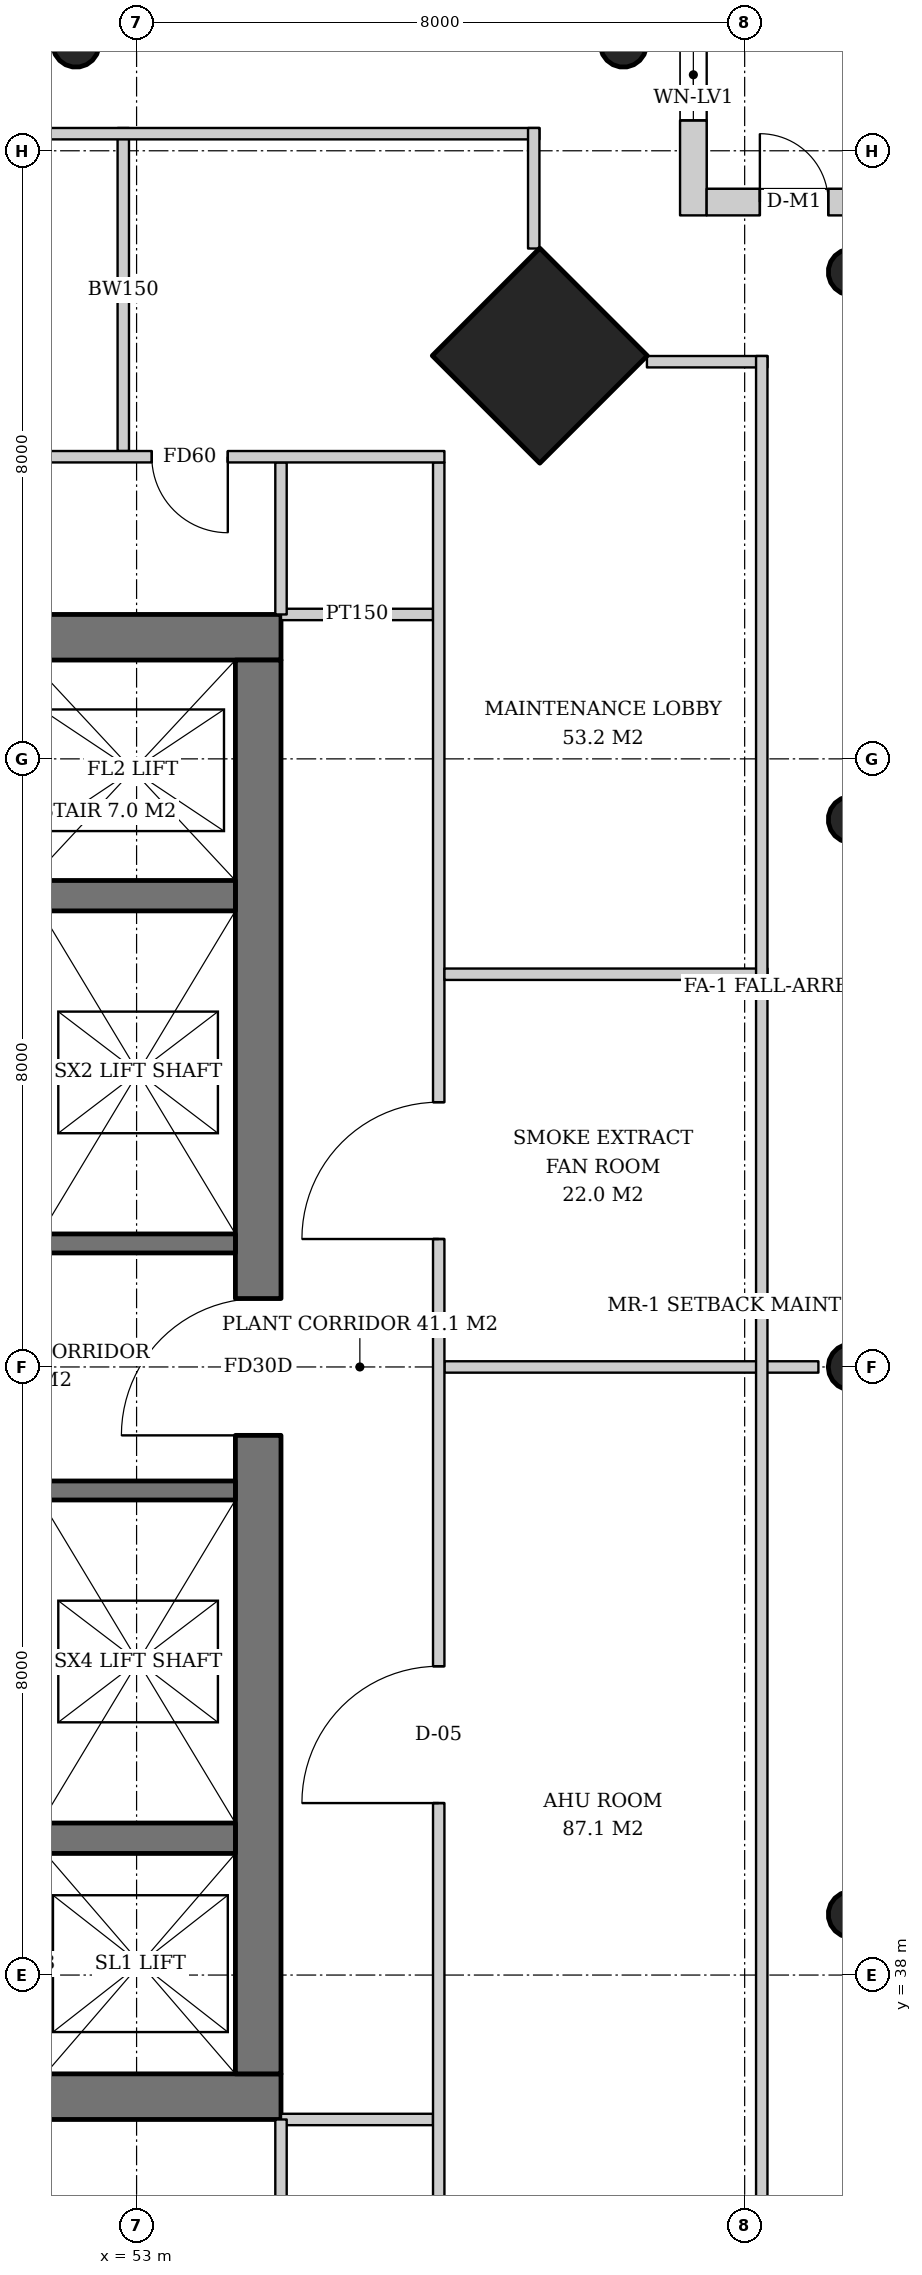
"""IFC4 building model, lengths in metres.
Left out: names, types, materials, properties, quantities, classifications, styles, units other than length and angle.
Written with IfcOpenShell. Run it as: python <this file> out.ifc"""

import sys

from ifc_helpers import new_model, si_unit, direction, frame, frame_2d, origin, origin_2d, place, context, subcontext, project, spatial, rectangle, hollow_circle, extrude, element, fill, save


model = new_model("IFC4")
c1 = context("Model", 3, precision=1e-05, world=origin(), true_north=direction((0.0, 1.0)))
c2 = subcontext(c1, "Body", "Model", "MODEL_VIEW")
j1 = project(units=[si_unit("LENGTHUNIT", "METRE"), si_unit("PLANEANGLEUNIT", "RADIAN")], contexts=[c1])
p1 = place(None, origin())
s1 = spatial("IfcSite", under=j1, at=p1, CompositionType="ELEMENT")
p2 = place(p1, origin())
s2 = spatial("IfcBuilding", under=s1, at=p2, CompositionType="ELEMENT")
p3 = place(p2, frame((0.0, 0.0, 226.2)))
s3 = spatial("IfcBuildingStorey", under=s2, at=p3, CompositionType="ELEMENT", Elevation=226.2)
p4 = place(p3, frame((58.343, 59.343, 0.0), z_axis=(-0.031898107953, -0.031898107953, 0.998981992539), x_axis=(0.707106781187, -0.707106781187, 0.0)))
e1 = element("IfcColumn", 1, at=p4, inside=s3, PredefinedType="COLUMN", context=c2, shape_type="SweptSolid", body=[
    extrude(rectangle(XDim=2.0, YDim=2.0, at=origin_2d()), origin(), (0.0, 0.0, 1.0), 3.804),
])
p5 = place(p3, frame((62.443, 60.443, 0.0), z_axis=(-0.031898107953, -0.031898107953, 0.998981992539), x_axis=(0.707106781187, -0.707106781187, 0.0)))
e2 = element("IfcColumn", 2, at=p5, inside=s3, PredefinedType="COLUMN", context=c2, shape_type="SweptSolid", body=[
    extrude(hollow_circle(Radius=0.305, WallThickness=0.025, at=origin_2d()), origin(), (0.0, 0.0, 1.0), 3.804),
])
p6 = place(p3, frame((62.443, 38.779, 0.0), z_axis=(-0.031910269556, 0.015987237665, 0.999362868496), x_axis=(-0.447933021895, -0.894067115991, 0.0)))
e3 = element("IfcColumn", 3, at=p6, inside=s3, PredefinedType="COLUMN", context=c2, shape_type="SweptSolid", body=[
    extrude(hollow_circle(Radius=0.305, WallThickness=0.025, at=origin_2d()), origin(), (0.0, 0.0, 1.0), 3.802),
])
p7 = place(p3, frame((62.443, 46.0, 0.0), z_axis=(-0.031914348339, 0.0, 0.999490607445), x_axis=(0.0, -1.0, 0.0)))
e4 = element("IfcColumn", 4, at=p7, inside=s3, PredefinedType="COLUMN", context=c2, shape_type="SweptSolid", body=[
    extrude(hollow_circle(Radius=0.305, WallThickness=0.025, at=origin_2d()), origin(), (0.0, 0.0, 1.0), 3.802),
])
p8 = place(p3, frame((62.443, 53.221, 0.0), z_axis=(-0.031910269556, -0.015987237665, 0.999362868496), x_axis=(0.447933021895, -0.894067115991, 0.0)))
e5 = element("IfcColumn", 5, at=p8, inside=s3, PredefinedType="COLUMN", context=c2, shape_type="SweptSolid", body=[
    extrude(hollow_circle(Radius=0.305, WallThickness=0.025, at=origin_2d()), origin(), (0.0, 0.0, 1.0), 3.802),
])
p9 = place(p3, frame((59.443, 63.443, 0.0), z_axis=(-0.031898107953, -0.031898107953, 0.998981992539), x_axis=(0.707106781187, -0.707106781187, 0.0)))
e6 = element("IfcColumn", 6, at=p9, inside=s3, PredefinedType="COLUMN", context=c2, shape_type="SweptSolid", body=[
    extrude(hollow_circle(Radius=0.305, WallThickness=0.025, at=origin_2d()), origin(), (0.0, 0.0, 1.0), 3.804),
])
p10 = place(p3, frame((52.221, 63.443, 0.0), z_axis=(-0.015987237665, -0.031910269556, 0.999362868496), x_axis=(0.894067115991, -0.447933021895, 0.0)))
e7 = element("IfcColumn", 7, at=p10, inside=s3, PredefinedType="COLUMN", context=c2, shape_type="SweptSolid", body=[
    extrude(hollow_circle(Radius=0.305, WallThickness=0.025, at=origin_2d()), origin(), (0.0, 0.0, 1.0), 3.802),
])
p11 = place(p3, frame((35.1, 36.4, 0.0), z_axis=(0.0, 0.0, 1.0), x_axis=(1.0, 0.0, 0.0)))
e8 = element("IfcWall", 8, at=p11, inside=s3, PredefinedType="SHEAR", context=c2, shape_type="SweptSolid", body=[
    extrude(rectangle(XDim=19.8, YDim=0.6, at=frame_2d((9.9, 0.0))), origin(), (0.0, 0.0, 1.0), 3.8),
])
p12 = place(p11, frame((3.9, 0.0, 0.0)))
e9 = element("IfcOpeningElement", 9, at=p12, cuts=e8, PredefinedType="OPENING", context=c2, shape_type="SweptSolid", body=[
    extrude(rectangle(XDim=1.0, YDim=2.1, at=frame_2d((0.5, 1.05))), frame((0.0, 0.31, 0.0), z_axis=(0.0, -1.0, 0.0), x_axis=(1.0, 0.0, 0.0)), (0.0, 0.0, 1.0), 0.62),
])
p13 = place(p11, frame((15.35, 0.0, 0.0)))
e10 = element("IfcOpeningElement", 10, at=p13, cuts=e8, PredefinedType="OPENING", context=c2, shape_type="SweptSolid", body=[
    extrude(rectangle(XDim=1.0, YDim=2.1, at=frame_2d((0.5, 1.05))), frame((0.0, 0.31, 0.0), z_axis=(0.0, -1.0, 0.0), x_axis=(1.0, 0.0, 0.0)), (0.0, 0.0, 1.0), 0.62),
])
p14 = place(p3, frame((35.1, 55.6, 0.0), z_axis=(0.0, 0.0, 1.0), x_axis=(1.0, 0.0, 0.0)))
e11 = element("IfcWall", 11, at=p14, inside=s3, PredefinedType="SHEAR", context=c2, shape_type="SweptSolid", body=[
    extrude(rectangle(XDim=19.8, YDim=0.6, at=frame_2d((9.9, 0.0))), origin(), (0.0, 0.0, 1.0), 3.8),
])
p15 = place(p14, frame((14.54, 0.0, 0.0)))
e12 = element("IfcOpeningElement", 12, at=p15, cuts=e11, PredefinedType="OPENING", context=c2, shape_type="SweptSolid", body=[
    extrude(rectangle(XDim=1.0, YDim=2.1, at=frame_2d((0.5, 1.05))), frame((0.0, 0.31, 0.0), z_axis=(0.0, -1.0, 0.0), x_axis=(1.0, 0.0, 0.0)), (0.0, 0.0, 1.0), 0.62),
])
p16 = place(p14, frame((2.425, 0.0, 0.0)))
e13 = element("IfcOpeningElement", 13, at=p16, cuts=e11, PredefinedType="OPENING", context=c2, shape_type="SweptSolid", body=[
    extrude(rectangle(XDim=1.0, YDim=2.1, at=frame_2d((0.5, 1.05))), frame((0.0, 0.31, 0.0), z_axis=(0.0, -1.0, 0.0), x_axis=(1.0, 0.0, 0.0)), (0.0, 0.0, 1.0), 0.62),
])
p17 = place(p3, frame((54.6, 36.7, 0.0), z_axis=(0.0, 0.0, 1.0), x_axis=(0.0, 1.0, 0.0)))
e14 = element("IfcWall", 14, at=p17, inside=s3, PredefinedType="SHEAR", context=c2, shape_type="SweptSolid", body=[
    extrude(rectangle(XDim=18.6, YDim=0.6, at=frame_2d((9.3, 0.0))), origin(), (0.0, 0.0, 1.0), 3.8),
])
p18 = place(p17, frame((8.4, 0.0, 0.0)))
e15 = element("IfcOpeningElement", 15, at=p18, cuts=e14, PredefinedType="OPENING", context=c2, shape_type="SweptSolid", body=[
    extrude(rectangle(XDim=1.8, YDim=2.4, at=frame_2d((0.9, 1.2))), frame((0.0, 0.31, 0.0), z_axis=(0.0, -1.0, 0.0), x_axis=(1.0, 0.0, 0.0)), (0.0, 0.0, 1.0), 0.62),
])
p19 = place(p3, frame((35.7, 39.8, 0.0), z_axis=(0.0, 0.0, 1.0), x_axis=(1.0, 0.0, 0.0)))
e16 = element("IfcWall", 16, at=p19, inside=s3, PredefinedType="SHEAR", context=c2, shape_type="SweptSolid", body=[
    extrude(rectangle(XDim=18.6, YDim=0.4, at=frame_2d((9.3, 0.0))), origin(), (0.0, 0.0, 1.0), 3.8),
])
p20 = place(p19, frame((3.3, 0.0, 0.0)))
e17 = element("IfcOpeningElement", 17, at=p20, cuts=e16, PredefinedType="OPENING", context=c2, shape_type="SweptSolid", body=[
    extrude(rectangle(XDim=1.0, YDim=2.1, at=frame_2d((0.5, 1.05))), frame((0.0, 0.21, 0.0), z_axis=(0.0, -1.0, 0.0), x_axis=(1.0, 0.0, 0.0)), (0.0, 0.0, 1.0), 0.42),
])
p21 = place(p3, frame((35.7, 52.2, 0.0), z_axis=(0.0, 0.0, 1.0), x_axis=(1.0, 0.0, 0.0)))
e18 = element("IfcWall", 18, at=p21, inside=s3, PredefinedType="SHEAR", context=c2, shape_type="SweptSolid", body=[
    extrude(rectangle(XDim=18.6, YDim=0.4, at=frame_2d((9.3, 0.0))), origin(), (0.0, 0.0, 1.0), 3.8),
])
p22 = place(p21, frame((11.33, 0.0, 0.0)))
e19 = element("IfcOpeningElement", 19, at=p22, cuts=e18, PredefinedType="OPENING", context=c2, shape_type="SweptSolid", body=[
    extrude(rectangle(XDim=1.0, YDim=2.1, at=frame_2d((0.5, 1.05))), frame((0.0, 0.21, 0.0), z_axis=(0.0, -1.0, 0.0), x_axis=(1.0, 0.0, 0.0)), (0.0, 0.0, 1.0), 0.42),
])
p23 = place(p3, frame((60.325, 64.5, 0.0), z_axis=(0.0, 0.0, 1.0), x_axis=(0.0, -1.0, 0.0)))
e20 = element("IfcWall", 20, at=p23, inside=s3, PredefinedType="SOLIDWALL", context=c2, shape_type="SweptSolid", body=[
    extrude(rectangle(XDim=3.35, YDim=0.35, at=frame_2d((1.675, 0.0))), origin(), (0.0, 0.0, 1.0), 3.52),
])
p24 = place(p23, frame((0.9, 0.0, 0.6)))
e21 = element("IfcOpeningElement", 21, at=p24, cuts=e20, PredefinedType="OPENING", context=c2, shape_type="SweptSolid", body=[
    extrude(rectangle(XDim=1.2, YDim=2.55, at=frame_2d((0.6, 1.275))), frame((0.0, 0.185, 0.0), z_axis=(0.0, -1.0, 0.0), x_axis=(1.0, 0.0, 0.0)), (0.0, 0.0, 1.0), 0.37),
])
p25 = place(p3, frame((60.5, 61.325, 0.0), z_axis=(0.0, 0.0, 1.0), x_axis=(1.0, 0.0, 0.0)))
e22 = element("IfcWall", 22, at=p25, inside=s3, PredefinedType="SOLIDWALL", context=c2, shape_type="SweptSolid", body=[
    extrude(rectangle(XDim=3.0, YDim=0.35, at=frame_2d((1.5, 0.0))), origin(), (0.0, 0.0, 1.0), 3.52),
])
p26 = place(p25, frame((0.7, 0.0, 0.0)))
e23 = element("IfcOpeningElement", 23, at=p26, cuts=e22, PredefinedType="OPENING", context=c2, shape_type="SweptSolid", body=[
    extrude(rectangle(XDim=0.9, YDim=2.1, at=frame_2d((0.45, 1.05))), frame((0.0, 0.185, 0.0), z_axis=(0.0, -1.0, 0.0), x_axis=(1.0, 0.0, 0.0)), (0.0, 0.0, 1.0), 0.37),
])
for number, where, z_axis, x_axis in (
    (24, (48.93, 47.625, 0.0), (0.0, 0.0, 1.0), (1.0, 0.0, 0.0)),
    (25, (48.93, 44.375, 0.0), (0.0, 0.0, 1.0), (1.0, 0.0, 0.0)),
):
    element("IfcWall", number, at=place(p3, frame(where, z_axis=z_axis, x_axis=x_axis)), inside=s3, PredefinedType="SHEAR", context=c2, shape_type="SweptSolid", body=[
        extrude(rectangle(XDim=5.37, YDim=0.25, at=frame_2d((2.685, 0.0))), origin(), (0.0, 0.0, 1.0), 3.8),
    ])
for number, where, z_axis, x_axis in (
    (26, (54.9, 55.9, 0.0), (0.0, 0.0, 1.0), (1.0, 0.0, 0.0)),
    (27, (54.9, 36.1, 0.0), (0.0, 0.0, 1.0), (1.0, 0.0, 0.0)),
):
    element("IfcWall", number, at=place(p3, frame(where, z_axis=z_axis, x_axis=x_axis)), inside=s3, PredefinedType="PARTITIONING", context=c2, shape_type="SweptSolid", body=[
        extrude(rectangle(XDim=2.0, YDim=0.15, at=frame_2d((1.0, 0.0))), origin(), (0.0, 0.0, 1.0), 3.52),
    ])
p27 = place(p3, frame((57.05, 46.0, 0.0), z_axis=(0.0, 0.0, 1.0), x_axis=(1.0, 0.0, 0.0)))
e28 = element("IfcWall", 28, at=p27, inside=s3, PredefinedType="SOLIDWALL", context=c2, shape_type="SweptSolid", body=[
    extrude(rectangle(XDim=4.92, YDim=0.15, at=frame_2d((2.46, 0.0))), origin(), (0.0, 0.0, 1.0), 3.52),
])
p28 = place(p3, frame((56.975, 33.95, 0.0), z_axis=(0.0, 0.0, 1.0), x_axis=(0.0, 1.0, 0.0)))
e29 = element("IfcWall", 29, at=p28, inside=s3, PredefinedType="SOLIDWALL", context=c2, shape_type="SweptSolid", body=[
    extrude(rectangle(XDim=23.95, YDim=0.15, at=frame_2d((11.975, 0.0))), origin(), (0.0, 0.0, 1.0), 2.706),
])
p29 = place(p28, frame((6.312, 0.0, 0.0)))
e30 = element("IfcOpeningElement", 30, at=p29, cuts=e29, PredefinedType="OPENING", context=c2, shape_type="SweptSolid", body=[
    extrude(rectangle(XDim=1.8, YDim=2.4, at=frame_2d((0.9, 1.2))), frame((0.0, 0.085, 0.0), z_axis=(0.0, -1.0, 0.0), x_axis=(1.0, 0.0, 0.0)), (0.0, 0.0, 1.0), 0.17),
])
p30 = place(p28, frame((13.733, 0.0, 0.0)))
e31 = element("IfcOpeningElement", 31, at=p30, cuts=e29, PredefinedType="OPENING", context=c2, shape_type="SweptSolid", body=[
    extrude(rectangle(XDim=1.8, YDim=2.4, at=frame_2d((0.9, 1.2))), frame((0.0, 0.085, 0.0), z_axis=(0.0, -1.0, 0.0), x_axis=(1.0, 0.0, 0.0)), (0.0, 0.0, 1.0), 0.17),
])
p31 = place(p3, frame((57.05, 51.167, 0.0), z_axis=(0.0, 0.0, 1.0), x_axis=(1.0, 0.0, 0.0)))
e32 = element("IfcWall", 32, at=p31, inside=s3, PredefinedType="SOLIDWALL", context=c2, shape_type="SweptSolid", body=[
    extrude(rectangle(XDim=4.25, YDim=0.15, at=frame_2d((2.125, 0.0))), origin(), (0.0, 0.0, 1.0), 3.52),
])
p32 = place(p3, frame((54.9, 55.9, 0.0), z_axis=(0.0, 0.0, 1.0), x_axis=(0.0, 1.0, 0.0)))
e33 = element("IfcWall", 33, at=p32, inside=s3, PredefinedType="PARTITIONING", context=c2, shape_type="SweptSolid", body=[
    extrude(rectangle(XDim=2.0, YDim=0.15, at=frame_2d((1.0, 0.0))), origin(), (0.0, 0.0, 1.0), 3.52),
])
p33 = place(p3, frame((52.825, 58.05, 0.0), z_axis=(0.0, 0.0, 1.0), x_axis=(0.0, 1.0, 0.0)))
e34 = element("IfcWall", 34, at=p33, inside=s3, PredefinedType="SOLIDWALL", context=c2, shape_type="SweptSolid", body=[
    extrude(rectangle(XDim=4.25, YDim=0.15, at=frame_2d((2.125, 0.0))), origin(), (0.0, 0.0, 1.0), 3.52),
])
p34 = place(p3, frame((57.05, 57.975, 0.0), z_axis=(0.0, 0.0, 1.0), x_axis=(-1.0, 0.0, 0.0)))
e35 = element("IfcWall", 35, at=p34, inside=s3, PredefinedType="SOLIDWALL", context=c2, shape_type="SweptSolid", body=[
    extrude(rectangle(XDim=23.95, YDim=0.15, at=frame_2d((11.975, 0.0))), origin(), (0.0, 0.0, 1.0), 2.706),
])
p35 = place(p34, frame((2.85, 0.0, 0.0)))
e36 = element("IfcOpeningElement", 36, at=p35, cuts=e35, PredefinedType="OPENING", context=c2, shape_type="SweptSolid", body=[
    extrude(rectangle(XDim=1.0, YDim=2.1, at=frame_2d((0.5, 1.05))), frame((0.0, 0.085, 0.0), z_axis=(0.0, -1.0, 0.0), x_axis=(1.0, 0.0, 0.0)), (0.0, 0.0, 1.0), 0.17),
])
p36 = place(p34, frame((7.35, 0.0, 0.0)))
e37 = element("IfcOpeningElement", 37, at=p36, cuts=e35, PredefinedType="OPENING", context=c2, shape_type="SweptSolid", body=[
    extrude(rectangle(XDim=1.8, YDim=2.4, at=frame_2d((0.9, 1.2))), frame((0.0, 0.085, 0.0), z_axis=(0.0, -1.0, 0.0), x_axis=(1.0, 0.0, 0.0)), (0.0, 0.0, 1.0), 0.17),
])
p37 = place(p34, frame((13.733, 0.0, 0.0)))
e38 = element("IfcOpeningElement", 38, at=p37, cuts=e35, PredefinedType="OPENING", context=c2, shape_type="SweptSolid", body=[
    extrude(rectangle(XDim=1.8, YDim=2.4, at=frame_2d((0.9, 1.2))), frame((0.0, 0.085, 0.0), z_axis=(0.0, -1.0, 0.0), x_axis=(1.0, 0.0, 0.0)), (0.0, 0.0, 1.0), 0.17),
])
p38 = place(p3, frame((54.9, 36.1, 0.0), z_axis=(0.0, 0.0, 1.0), x_axis=(0.0, -1.0, 0.0)))
e39 = element("IfcWall", 39, at=p38, inside=s3, PredefinedType="PARTITIONING", context=c2, shape_type="SweptSolid", body=[
    extrude(rectangle(XDim=2.0, YDim=0.15, at=frame_2d((1.0, 0.0))), origin(), (0.0, 0.0, 1.0), 3.52),
])
p39 = place(p3, frame((31.7, 62.225, 0.0), z_axis=(0.0, 0.0, 1.0), x_axis=(1.0, 0.0, 0.0)))
e40 = element("IfcWall", 40, at=p39, inside=s3, PredefinedType="PARTITIONING", context=c2, shape_type="SweptSolid", body=[
    extrude(rectangle(XDim=26.6, YDim=0.15, at=frame_2d((13.3, 0.0))), origin(), (0.0, 0.0, 1.0), 2.706),
])
for number, where, z_axis, x_axis in (
    (41, (58.225, 62.3, 0.0), (0.0, 0.0, 1.0), (0.0, -1.0, 0.0)),
    (42, (59.714, 59.225, 0.0), (0.0, 0.0, 1.0), (1.0, 0.0, 0.0)),
):
    element("IfcWall", number, at=place(p3, frame(where, z_axis=z_axis, x_axis=x_axis)), inside=s3, PredefinedType="PARTITIONING", context=c2, shape_type="SweptSolid", body=[
        extrude(rectangle(XDim=1.586, YDim=0.15, at=frame_2d((0.793, 0.0))), origin(), (0.0, 0.0, 1.0), 3.52),
    ])
p40 = place(p3, frame((61.225, 59.3, 0.0), z_axis=(0.0, 0.0, 1.0), x_axis=(0.0, -1.0, 0.0)))
e43 = element("IfcWall", 43, at=p40, inside=s3, PredefinedType="PARTITIONING", context=c2, shape_type="SweptSolid", body=[
    extrude(rectangle(XDim=26.6, YDim=0.15, at=frame_2d((13.3, 0.0))), origin(), (0.0, 0.0, 1.0), 2.706),
])
p41 = place(p26, origin())
e44 = element("IfcDoor", 44, at=p41, inside=s3, OperationType="SINGLE_SWING_LEFT", PredefinedType="DOOR", context=c2, shape_type="SweptSolid", body=[
    extrude(rectangle(XDim=0.9, YDim=2.1, at=frame_2d((0.45, 1.05))), frame((0.0, 0.025, 0.0), z_axis=(0.0, -1.0, 0.0), x_axis=(1.0, 0.0, 0.0)), (0.0, 0.0, 1.0), 0.05),
])
fill(e23, e44)
p42 = place(p24, origin())
e45 = element("IfcWindow", 45, at=p42, inside=s3, PartitioningType="SINGLE_PANEL", PredefinedType="USERDEFINED", context=c2, shape_type="SweptSolid", body=[
    extrude(rectangle(XDim=1.2, YDim=2.55, at=frame_2d((0.6, 1.275))), frame((0.0, 0.03, 0.0), z_axis=(0.0, -1.0, 0.0), x_axis=(1.0, 0.0, 0.0)), (0.0, 0.0, 1.0), 0.06),
])
fill(e21, e45)
p43 = place(p18, origin())
e46 = element("IfcDoor", 46, at=p43, inside=s3, OperationType="DOUBLE_DOOR_SINGLE_SWING", PredefinedType="DOOR", context=c2, shape_type="SweptSolid", body=[
    extrude(rectangle(XDim=1.8, YDim=2.4, at=frame_2d((0.9, 1.2))), frame((0.0, 0.025, 0.0), z_axis=(0.0, -1.0, 0.0), x_axis=(1.0, 0.0, 0.0)), (0.0, 0.0, 1.0), 0.05),
])
fill(e15, e46)
p44 = place(p29, origin())
e47 = element("IfcDoor", 47, at=p44, inside=s3, OperationType="DOUBLE_DOOR_SINGLE_SWING", PredefinedType="DOOR", context=c2, shape_type="SweptSolid", body=[
    extrude(rectangle(XDim=1.8, YDim=2.4, at=frame_2d((0.9, 1.2))), frame((0.0, 0.025, 0.0), z_axis=(0.0, -1.0, 0.0), x_axis=(1.0, 0.0, 0.0)), (0.0, 0.0, 1.0), 0.05),
])
fill(e30, e47)
p45 = place(p30, origin())
e48 = element("IfcDoor", 48, at=p45, inside=s3, OperationType="DOUBLE_DOOR_SINGLE_SWING", PredefinedType="DOOR", context=c2, shape_type="SweptSolid", body=[
    extrude(rectangle(XDim=1.8, YDim=2.4, at=frame_2d((0.9, 1.2))), frame((0.0, 0.025, 0.0), z_axis=(0.0, -1.0, 0.0), x_axis=(1.0, 0.0, 0.0)), (0.0, 0.0, 1.0), 0.05),
])
fill(e31, e48)
p46 = place(p35, origin())
e49 = element("IfcDoor", 49, at=p46, inside=s3, OperationType="SINGLE_SWING_LEFT", PredefinedType="DOOR", context=c2, shape_type="SweptSolid", body=[
    extrude(rectangle(XDim=1.0, YDim=2.1, at=frame_2d((0.5, 1.05))), frame((0.0, 0.025, 0.0), z_axis=(0.0, -1.0, 0.0), x_axis=(1.0, 0.0, 0.0)), (0.0, 0.0, 1.0), 0.05),
])
fill(e36, e49)
save(model, sys.argv[1])
